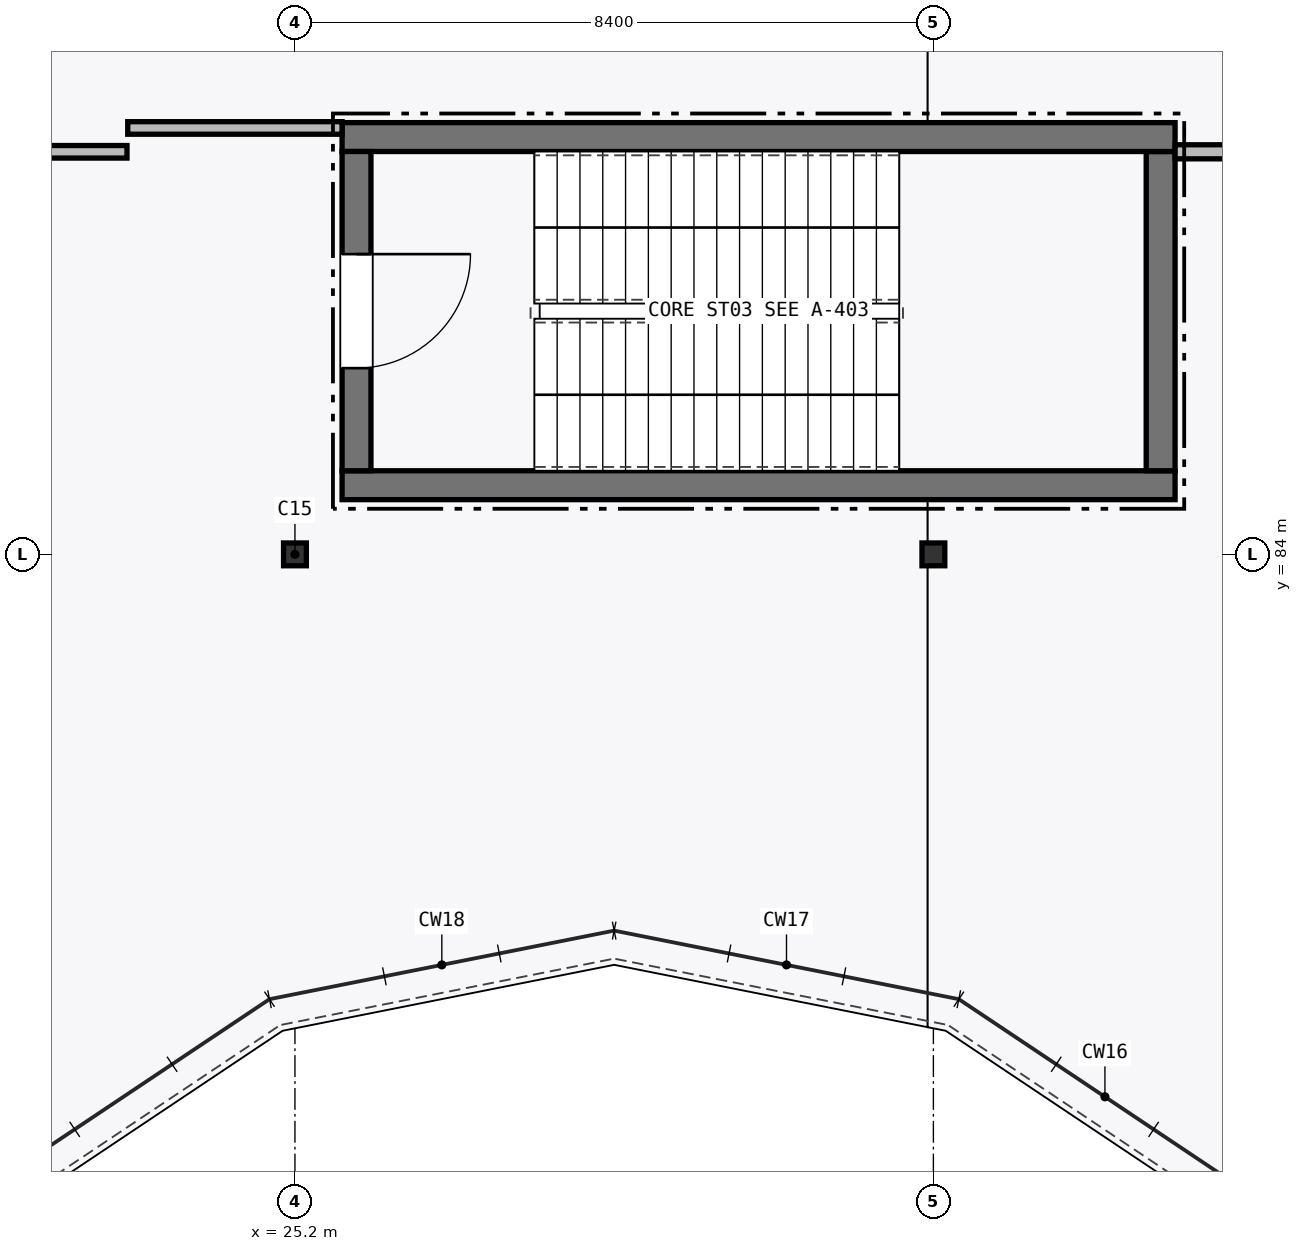
"""IFC4 building model, lengths in metres.
Left out: names, types, materials, properties, quantities, classifications, styles, units other than length and angle.
Written with IfcOpenShell. Run it as: python <this file> out.ifc"""

import sys

from ifc_helpers import new_model, si_unit, direction, frame, frame_2d, origin, origin_2d, place, context, subcontext, project, spatial, rectangle, i_section, extrude, element, fill, save


model = new_model("IFC4")
c1 = context("Model", 3, precision=1e-05, world=origin(), true_north=direction((0.0, 1.0)))
c2 = subcontext(c1, "Body", "Model", "MODEL_VIEW")
j1 = project(units=[si_unit("LENGTHUNIT", "METRE"), si_unit("PLANEANGLEUNIT", "RADIAN")], contexts=[c1])
p1 = place(None, origin())
s1 = spatial("IfcSite", under=j1, at=p1, CompositionType="ELEMENT")
p2 = place(p1, origin())
s2 = spatial("IfcBuilding", under=s1, at=p2, CompositionType="ELEMENT")
p3 = place(p2, frame((0.0, 0.0, 21.6)))
s3 = spatial("IfcBuildingStorey", under=s2, at=p3, CompositionType="ELEMENT", Elevation=21.6)
for number, where, z_axis, x_axis in (
    (1, (25.2, 84.0, 0.0), (0.0, 0.0, 1.0), (1.0, 0.0, 0.0)),
    (2, (33.6, 84.0, 0.0), (0.0, 0.0, 1.0), (1.0, 0.0, 0.0)),
):
    element("IfcColumn", number, at=place(p3, frame(where, z_axis=z_axis, x_axis=x_axis)), inside=s3, PredefinedType="COLUMN", context=c2, shape_type="SweptSolid", body=[
        extrude(i_section(OverallWidth=0.3, OverallDepth=0.3, WebThickness=0.01, FlangeThickness=0.015, FilletRadius=0.018, at=origin_2d()), origin(), (0.0, 0.0, 1.0), 5.1),
    ])
p4 = place(p3, frame((25.82, 84.91, 0.0), z_axis=(0.0, 0.0, 1.0), x_axis=(1.0, 0.0, 0.0)))
e3 = element("IfcWall", 3, at=p4, inside=s3, PredefinedType="SHEAR", context=c2, shape_type="SweptSolid", body=[
    extrude(rectangle(XDim=10.96, YDim=0.38, at=frame_2d((5.48, 0.0))), origin(), (0.0, 0.0, 1.0), 4.845),
])
p5 = place(p3, frame((36.59, 85.1, 0.0), z_axis=(0.0, 0.0, 1.0), x_axis=(0.0, 1.0, 0.0)))
e4 = element("IfcWall", 4, at=p5, inside=s3, PredefinedType="SHEAR", context=c2, shape_type="SweptSolid", body=[
    extrude(rectangle(XDim=4.2, YDim=0.38, at=frame_2d((2.1, 0.0))), origin(), (0.0, 0.0, 1.0), 4.845),
])
p6 = place(p3, frame((36.78, 89.49, 0.0), z_axis=(0.0, 0.0, 1.0), x_axis=(-1.0, 0.0, 0.0)))
e5 = element("IfcWall", 5, at=p6, inside=s3, PredefinedType="SHEAR", context=c2, shape_type="SweptSolid", body=[
    extrude(rectangle(XDim=10.96, YDim=0.38, at=frame_2d((5.48, 0.0))), origin(), (0.0, 0.0, 1.0), 4.845),
])
p7 = place(p3, frame((26.01, 89.3, 0.0), z_axis=(0.0, 0.0, 1.0), x_axis=(0.0, -1.0, 0.0)))
e6 = element("IfcWall", 6, at=p7, inside=s3, PredefinedType="SHEAR", context=c2, shape_type="SweptSolid", body=[
    extrude(rectangle(XDim=4.2, YDim=0.38, at=frame_2d((2.1, 0.0))), origin(), (0.0, 0.0, 1.0), 4.845),
])
p8 = place(p7, frame((1.35, 0.0, 0.0)))
e7 = element("IfcOpeningElement", 7, at=p8, cuts=e6, PredefinedType="OPENING", context=c2, shape_type="SweptSolid", body=[
    extrude(rectangle(XDim=1.5, YDim=2.15, at=frame_2d((0.75, 1.075))), frame((0.0, 0.2, 0.0), z_axis=(0.0, -1.0, 0.0), x_axis=(1.0, 0.0, 0.0)), (0.0, 0.0, 1.0), 0.4),
])
p9 = place(p3, frame((43.335, 89.296, 0.0), z_axis=(0.0, 0.0, 1.0), x_axis=(-1.0, 0.0, 0.0)))
e8 = element("IfcWall", 8, at=p9, inside=s3, PredefinedType="PARTITIONING", context=c2, shape_type="SweptSolid", body=[
    extrude(rectangle(XDim=6.555, YDim=0.185, at=frame_2d((3.277, 0.0))), origin(), (0.0, 0.0, 1.0), 4.845),
])
p10 = place(p3, frame((16.935, 89.296, 0.0), z_axis=(0.0, 0.0, 1.0), x_axis=(1.0, 0.0, 0.0)))
e9 = element("IfcWall", 9, at=p10, inside=s3, PredefinedType="PARTITIONING", context=c2, shape_type="SweptSolid", body=[
    extrude(rectangle(XDim=6.055, YDim=0.165, at=frame_2d((3.027, 0.0))), origin(), (0.0, 0.0, 1.0), 4.845),
])
p11 = place(p10, frame((2.377, 0.0, 0.0)))
e10 = element("IfcOpeningElement", 10, at=p11, cuts=e9, PredefinedType="OPENING", context=c2, shape_type="SweptSolid", body=[
    extrude(rectangle(XDim=1.3, YDim=2.2, at=frame_2d((0.65, 1.1))), frame((0.0, 0.093, 0.0), z_axis=(0.0, -1.0, 0.0), x_axis=(1.0, 0.0, 0.0)), (0.0, 0.0, 1.0), 0.185),
])
p12 = place(p3, frame((23.0, 89.61, 0.0), z_axis=(0.0, 0.0, 1.0), x_axis=(1.0, 0.0, 0.0)))
e11 = element("IfcWall", 11, at=p12, inside=s3, PredefinedType="PARTITIONING", context=c2, shape_type="SweptSolid", body=[
    extrude(rectangle(XDim=2.82, YDim=0.165, at=frame_2d((1.41, 0.0))), origin(), (0.0, 0.0, 1.0), 4.845),
])
p13 = place(p8, origin())
e12 = element("IfcDoor", 12, at=p13, inside=s3, OperationType="SINGLE_SWING_LEFT", PredefinedType="DOOR", context=c2, shape_type="SweptSolid", body=[
    extrude(rectangle(XDim=1.5, YDim=2.15, at=frame_2d((0.75, 1.075))), frame((0.0, 0.025, 0.0), z_axis=(0.0, -1.0, 0.0), x_axis=(1.0, 0.0, 0.0)), (0.0, 0.0, 1.0), 0.05),
])
fill(e7, e12)
save(model, sys.argv[1])
